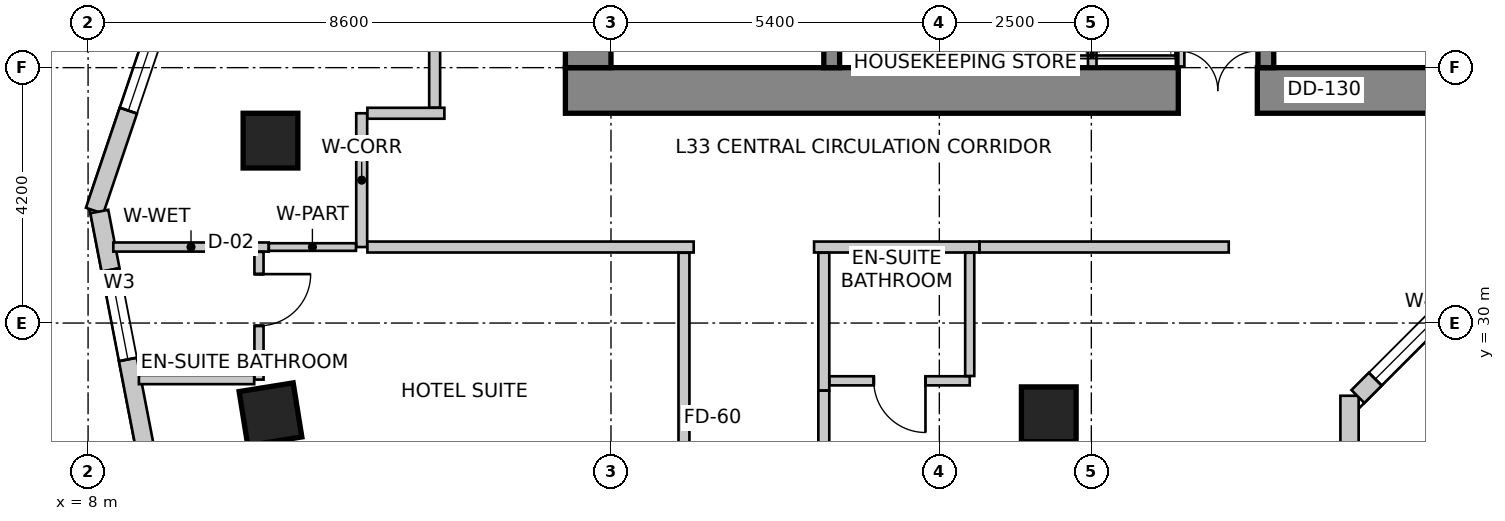
"""IFC4 building model, lengths in metres.
Left out: names, types, materials, properties, quantities, classifications, styles, units other than length and angle.
Written with IfcOpenShell. Run it as: python <this file> out.ifc"""

import sys

from ifc_helpers import new_model, si_unit, direction, frame, frame_2d, origin, origin_2d, place, context, subcontext, project, spatial, rectangle, extrude, source, transform, mapped, element, fill, save


model = new_model("IFC4")
c1 = context("Model", 3, precision=1e-05, world=origin(), true_north=direction((0.0, 1.0)))
c2 = subcontext(c1, "Body", "Model", "MODEL_VIEW")
j1 = project(units=[si_unit("LENGTHUNIT", "METRE"), si_unit("PLANEANGLEUNIT", "RADIAN")], contexts=[c1])
p1 = place(None, origin())
s1 = spatial("IfcSite", under=j1, at=p1, CompositionType="ELEMENT")
p2 = place(p1, origin())
s2 = spatial("IfcBuilding", under=s1, at=p2, CompositionType="ELEMENT")
p3 = place(p2, frame((0.0, 0.0, 135.8)))
s3 = spatial("IfcBuildingStorey", under=s2, at=p3, CompositionType="ELEMENT", Elevation=135.8)
p4 = place(p3, frame((15.85, 33.825, 0.0), z_axis=(0.0, 0.0, 1.0), x_axis=(1.0, 0.0, 0.0)))
e1 = element("IfcWall", 1, at=p4, inside=s3, PredefinedType="SHEAR", context=c2, shape_type="SweptSolid", body=[
    extrude(rectangle(XDim=15.9, YDim=0.75, at=frame_2d((7.95, 0.0))), origin(), (0.0, 0.0, 1.0), 3.6),
])
m1 = source(origin(), c2, "Body", "SweptSolid", [
    extrude(rectangle(XDim=1.3, YDim=2.15, at=frame_2d((0.65, 1.075))), frame((0.0, 0.385, 0.0), z_axis=(0.0, -1.0, 0.0), x_axis=(1.0, 0.0, 0.0)), (0.0, 0.0, 1.0), 0.77),
])
p5 = place(p4, frame((10.08, 0.0, 0.0)))
e2 = element("IfcOpeningElement", 2, at=p5, cuts=e1, PredefinedType="OPENING", context=c2, shape_type="MappedRepresentation", body=[
    mapped(m1, transform((0.0, 0.0, 0.0), scale=1.0)),
])
p6 = place(p3, frame((16.225, 34.2, 0.0), z_axis=(0.0, 0.0, 1.0), x_axis=(0.0, 1.0, 0.0)))
e3 = element("IfcWall", 3, at=p6, inside=s3, PredefinedType="SHEAR", context=c2, shape_type="SweptSolid", body=[
    extrude(rectangle(XDim=11.4, YDim=0.75, at=frame_2d((5.7, 0.0))), origin(), (0.0, 0.0, 1.0), 3.6),
])
m2 = source(origin(), c2, "Body", "SweptSolid", [
    extrude(rectangle(XDim=1.1, YDim=2.15, at=frame_2d((0.55, 1.075))), frame((0.0, 0.385, 0.0), z_axis=(0.0, -1.0, 0.0), x_axis=(1.0, 0.0, 0.0)), (0.0, 0.0, 1.0), 0.77),
])
p7 = place(p6, frame((7.15, 0.0, 0.0)))
e4 = element("IfcOpeningElement", 4, at=p7, cuts=e3, PredefinedType="OPENING", context=c2, shape_type="MappedRepresentation", body=[
    mapped(m2, transform((0.0, 0.0, 0.0), scale=1.0)),
])
p8 = place(p3, frame((20.23, 34.2, 0.0), z_axis=(0.0, 0.0, 1.0), x_axis=(0.0, 1.0, 0.0)))
e5 = element("IfcWall", 5, at=p8, inside=s3, PredefinedType="SHEAR", context=c2, shape_type="SweptSolid", body=[
    extrude(rectangle(XDim=9.06, YDim=0.26, at=frame_2d((4.53, 0.0))), origin(), (0.0, 0.0, 1.0), 3.6),
])
m3 = source(origin(), c2, "Body", "SweptSolid", [
    extrude(rectangle(XDim=1.1, YDim=2.15, at=frame_2d((0.55, 1.075))), frame((0.0, 0.14, 0.0), z_axis=(0.0, -1.0, 0.0), x_axis=(1.0, 0.0, 0.0)), (0.0, 0.0, 1.0), 0.28),
])
p9 = place(p8, frame((7.45, 0.0, 0.0)))
e6 = element("IfcOpeningElement", 6, at=p9, cuts=e5, PredefinedType="OPENING", context=c2, shape_type="MappedRepresentation", body=[
    mapped(m3, transform((0.0, 0.0, 0.0), scale=1.0)),
])
p10 = place(p3, frame((27.37, 34.2, 0.0), z_axis=(0.0, 0.0, 1.0), x_axis=(0.0, 1.0, 0.0)))
e7 = element("IfcWall", 7, at=p10, inside=s3, PredefinedType="SHEAR", context=c2, shape_type="SweptSolid", body=[
    extrude(rectangle(XDim=9.06, YDim=0.26, at=frame_2d((4.53, 0.0))), origin(), (0.0, 0.0, 1.0), 3.6),
])
p11 = place(p10, frame((7.45, 0.0, 0.0)))
e8 = element("IfcOpeningElement", 8, at=p11, cuts=e7, PredefinedType="OPENING", context=c2, shape_type="MappedRepresentation", body=[
    mapped(m3, transform((0.0, 0.0, 0.0), scale=1.0)),
])
m4 = source(origin(), c2, "Body", "SweptSolid", [
    extrude(rectangle(XDim=0.9, YDim=0.9, at=origin_2d()), origin(), (0.0, 0.0, 1.0), 3.6),
])
for number, where, z_axis, x_axis in (
    (9, (11.0, 33.0, 0.0), (0.0, 0.0, 1.0), (1.0, 0.0, 0.0)),
    (10, (11.0, 28.5, 0.0), (0.0, 0.0, 1.0), (0.158, -0.987, 0.0)),
    (11, (23.8, 28.5, 0.0), (0.0, 0.0, 1.0), (1.0, 0.0, 0.0)),
):
    element("IfcColumn", number, at=place(p3, frame(where, z_axis=z_axis, x_axis=x_axis)), inside=s3, PredefinedType="COLUMN", context=c2, shape_type="MappedRepresentation", body=[
        mapped(m4, transform((0.0, 0.0, 0.0), scale=1.0)),
    ])
p12 = place(p3, frame((28.746, 27.577, 0.0), z_axis=(0.0, 0.0, 1.0), x_axis=(0.0, 1.0, 0.0)))
e12 = element("IfcWall", 12, at=p12, inside=s3, PredefinedType="SOLIDWALL", context=c2, shape_type="SweptSolid", body=[
    extrude(rectangle(XDim=1.228, YDim=0.3, at=frame_2d((0.614, 0.0))), origin(), (0.0, 0.0, 1.0), 3.3),
])
p13 = place(p3, frame((28.884, 28.792, 0.0), z_axis=(0.0, 0.0, 1.0), x_axis=(0.707064797706, 0.707148762175, 0.0)))
e13 = element("IfcWall", 13, at=p13, inside=s3, PredefinedType="SOLIDWALL", context=c2, shape_type="SweptSolid", body=[
    extrude(rectangle(XDim=2.908, YDim=0.3, at=frame_2d((1.454, 0.0))), origin(), (0.0, 0.0, 1.0), 3.3),
])
m5 = source(origin(), c2, "Body", "SweptSolid", [
    extrude(rectangle(XDim=2.1, YDim=2.0, at=frame_2d((1.05, 1.0))), frame((0.0, 0.16, 0.0), z_axis=(0.0, -1.0, 0.0), x_axis=(1.0, 0.0, 0.0)), (0.0, 0.0, 1.0), 0.32),
])
p14 = place(p13, frame((0.404, 0.0, 0.85)))
e14 = element("IfcOpeningElement", 14, at=p14, cuts=e13, PredefinedType="OPENING", context=c2, shape_type="MappedRepresentation", body=[
    mapped(m5, transform((0.0, 0.0, 0.0), scale=1.0)),
])
p15 = place(p3, frame((13.269, 47.134, 0.0), z_axis=(0.0, 0.0, 1.0), x_axis=(-0.319929596295, -0.947441319246, 0.0)))
e15 = element("IfcWall", 15, at=p15, inside=s3, PredefinedType="SOLIDWALL", context=c2, shape_type="SweptSolid", body=[
    extrude(rectangle(XDim=16.134, YDim=0.3, at=frame_2d((8.067, 0.0))), origin(), (0.0, 0.0, 1.0), 3.3),
])
p16 = place(p15, frame((2.426, 0.0, 0.85)))
e16 = element("IfcOpeningElement", 16, at=p16, cuts=e15, PredefinedType="OPENING", context=c2, shape_type="MappedRepresentation", body=[
    mapped(m5, transform((0.0, 0.0, 0.0), scale=1.0)),
])
m6 = source(origin(), c2, "Body", "SweptSolid", [
    extrude(rectangle(XDim=2.4, YDim=2.2, at=frame_2d((1.2, 1.1))), frame((0.0, 0.16, 0.0), z_axis=(0.0, -1.0, 0.0), x_axis=(1.0, 0.0, 0.0)), (0.0, 0.0, 1.0), 0.32),
])
p17 = place(p15, frame((7.211, 0.0, 0.85)))
e17 = element("IfcOpeningElement", 17, at=p17, cuts=e15, PredefinedType="OPENING", context=c2, shape_type="MappedRepresentation", body=[
    mapped(m6, transform((0.0, 0.0, 0.0), scale=1.0)),
])
p18 = place(p15, frame((12.297, 0.0, 0.85)))
e18 = element("IfcOpeningElement", 18, at=p18, cuts=e15, PredefinedType="OPENING", context=c2, shape_type="MappedRepresentation", body=[
    mapped(m5, transform((0.0, 0.0, 0.0), scale=1.0)),
])
p19 = place(p3, frame((8.185, 31.834, 0.0), z_axis=(0.0, 0.0, 1.0), x_axis=(0.189707113148, -0.981840725994, 0.0)))
e19 = element("IfcWall", 19, at=p19, inside=s3, PredefinedType="SOLIDWALL", context=c2, shape_type="SweptSolid", body=[
    extrude(rectangle(XDim=21.221, YDim=0.3, at=frame_2d((10.611, 0.0))), origin(), (0.0, 0.0, 1.0), 3.3),
])
m7 = source(origin(), c2, "Body", "SweptSolid", [
    extrude(rectangle(XDim=1.5, YDim=1.8, at=frame_2d((0.75, 0.9))), frame((0.0, 0.16, 0.0), z_axis=(0.0, -1.0, 0.0), x_axis=(1.0, 0.0, 0.0)), (0.0, 0.0, 1.0), 0.32),
])
p20 = place(p19, frame((0.977, 0.0, 0.85)))
e20 = element("IfcOpeningElement", 20, at=p20, cuts=e19, PredefinedType="OPENING", context=c2, shape_type="MappedRepresentation", body=[
    mapped(m7, transform((0.0, 0.0, 0.0), scale=1.0)),
])
p21 = place(p19, frame((4.219, 0.0, 0.85)))
e21 = element("IfcOpeningElement", 21, at=p21, cuts=e19, PredefinedType="OPENING", context=c2, shape_type="MappedRepresentation", body=[
    mapped(m6, transform((0.0, 0.0, 0.0), scale=1.0)),
])
p22 = place(p19, frame((8.371, 0.0, 0.85)))
e22 = element("IfcOpeningElement", 22, at=p22, cuts=e19, PredefinedType="OPENING", context=c2, shape_type="MappedRepresentation", body=[
    mapped(m7, transform((0.0, 0.0, 0.0), scale=1.0)),
])
p23 = place(p19, frame((12.504, 0.0, 0.85)))
e23 = element("IfcOpeningElement", 23, at=p23, cuts=e19, PredefinedType="OPENING", context=c2, shape_type="MappedRepresentation", body=[
    mapped(m6, transform((0.0, 0.0, 0.0), scale=1.0)),
])
p24 = place(p19, frame((17.944, 0.0, 0.85)))
e24 = element("IfcOpeningElement", 24, at=p24, cuts=e19, PredefinedType="OPENING", context=c2, shape_type="MappedRepresentation", body=[
    mapped(m6, transform((0.0, 0.0, 0.0), scale=1.0)),
])
for number, where, z_axis, x_axis in (
    (25, (25.96, 34.22, 0.0), (0.0, 0.0, 1.0), (0.0, 1.0, 0.0)),
    (26, (23.07, 34.22, 0.0), (0.0, 0.0, 1.0), (0.0, 1.0, 0.0)),
    (27, (24.515, 34.22, 0.0), (0.0, 0.0, 1.0), (0.0, 1.0, 0.0)),
):
    element("IfcWall", number, at=place(p3, frame(where, z_axis=z_axis, x_axis=x_axis)), inside=s3, PredefinedType="SOLIDWALL", context=c2, shape_type="SweptSolid", body=[
        extrude(rectangle(XDim=1.62, YDim=0.14, at=frame_2d((0.81, 0.0))), origin(), (0.0, 0.0, 1.0), 2.592),
    ])
p25 = place(p3, frame((12.5, 31.25, 0.0), z_axis=(0.0, 0.0, 1.0), x_axis=(0.0, 1.0, 0.0)))
e28 = element("IfcWall", 28, at=p25, inside=s3, PredefinedType="PARTITIONING", context=c2, shape_type="SweptSolid", body=[
    extrude(rectangle(XDim=2.2, YDim=0.18, at=frame_2d((1.1, 0.0))), origin(), (0.0, 0.0, 1.0), 2.885),
])
p26 = place(p3, frame((12.594, 33.45, 0.0), z_axis=(0.0, 0.0, 1.0), x_axis=(1.0, 0.0, 0.0)))
e29 = element("IfcWall", 29, at=p26, inside=s3, PredefinedType="PARTITIONING", context=c2, shape_type="SweptSolid", body=[
    extrude(rectangle(XDim=1.266, YDim=0.18, at=frame_2d((0.633, 0.0))), origin(), (0.0, 0.0, 1.0), 3.3),
])
p27 = place(p3, frame((17.96, 31.25, 0.0), z_axis=(0.0, 0.0, 1.0), x_axis=(-1.0, 0.0, 0.0)))
e30 = element("IfcWall", 30, at=p27, inside=s3, PredefinedType="PARTITIONING", context=c2, shape_type="SweptSolid", body=[
    extrude(rectangle(XDim=5.366, YDim=0.18, at=frame_2d((2.683, 0.0))), origin(), (0.0, 0.0, 1.0), 2.885),
])
p28 = place(p3, frame((22.66, 31.25, 0.0), z_axis=(0.0, 0.0, 1.0), x_axis=(-1.0, 0.0, 0.0)))
e31 = element("IfcWall", 31, at=p28, inside=s3, PredefinedType="PARTITIONING", context=c2, shape_type="SweptSolid", body=[
    extrude(rectangle(XDim=2.72, YDim=0.18, at=frame_2d((1.36, 0.0))), origin(), (0.0, 0.0, 1.0), 2.885),
])
p29 = place(p3, frame((26.76, 31.25, 0.0), z_axis=(0.0, 0.0, 1.0), x_axis=(-1.0, 0.0, 0.0)))
e32 = element("IfcWall", 32, at=p29, inside=s3, PredefinedType="PARTITIONING", context=c2, shape_type="SweptSolid", body=[
    extrude(rectangle(XDim=4.098, YDim=0.18, at=frame_2d((2.049, 0.0))), origin(), (0.0, 0.0, 1.0), 3.3),
])
p30 = place(p3, frame((13.7, 33.544, 0.0), z_axis=(0.0, 0.0, 1.0), x_axis=(0.0, 1.0, 0.0)))
e33 = element("IfcWall", 33, at=p30, inside=s3, PredefinedType="PARTITIONING", context=c2, shape_type="SweptSolid", body=[
    extrude(rectangle(XDim=13.86, YDim=0.18, at=frame_2d((6.93, 0.0))), origin(), (0.0, 0.0, 1.0), 2.442),
])
m8 = source(origin(), c2, "Body", "SweptSolid", [
    extrude(rectangle(XDim=0.9, YDim=2.15, at=frame_2d((0.45, 1.075))), frame((0.0, 0.1, 0.0), z_axis=(0.0, -1.0, 0.0), x_axis=(1.0, 0.0, 0.0)), (0.0, 0.0, 1.0), 0.2),
])
p31 = place(p30, frame((4.253, 0.0, 0.0)))
e34 = element("IfcOpeningElement", 34, at=p31, cuts=e33, PredefinedType="OPENING", context=c2, shape_type="MappedRepresentation", body=[
    mapped(m8, transform((0.0, 0.0, 0.0), scale=1.0)),
])
p32 = place(p3, frame((10.971, 31.25, 0.0), z_axis=(0.0, 0.0, 1.0), x_axis=(-1.0, 0.0, 0.0)))
e35 = element("IfcWall", 35, at=p32, inside=s3, PredefinedType="PARTITIONING", context=c2, shape_type="SweptSolid", body=[
    extrude(rectangle(XDim=2.556, YDim=0.15, at=frame_2d((1.278, 0.0))), origin(), (0.0, 0.0, 1.0), 2.442),
])
p33 = place(p3, frame((12.406, 31.25, 0.0), z_axis=(0.0, 0.0, 1.0), x_axis=(-1.0, 0.0, 0.0)))
e36 = element("IfcWall", 36, at=p33, inside=s3, PredefinedType="PARTITIONING", context=c2, shape_type="SweptSolid", body=[
    extrude(rectangle(XDim=1.433, YDim=0.125, at=frame_2d((0.717, 0.0))), origin(), (0.0, 0.0, 1.0), 2.442),
])
p34 = place(p3, frame((17.8, 23.84, 0.0), z_axis=(0.0, 0.0, 1.0), x_axis=(0.0, 1.0, 0.0)))
e37 = element("IfcWall", 37, at=p34, inside=s3, PredefinedType="PARTITIONING", context=c2, shape_type="SweptSolid", body=[
    extrude(rectangle(XDim=7.316, YDim=0.18, at=frame_2d((3.658, 0.0))), origin(), (0.0, 0.0, 1.0), 2.738),
])
p35 = place(p34, frame((3.208, 0.0, 0.0)))
e38 = element("IfcOpeningElement", 38, at=p35, cuts=e37, PredefinedType="OPENING", context=c2, shape_type="MappedRepresentation", body=[
    mapped(m8, transform((0.0, 0.0, 0.0), scale=1.0)),
])
p36 = place(p3, frame((20.1, 31.156, 0.0), z_axis=(0.0, 0.0, 1.0), x_axis=(0.0, -1.0, 0.0)))
e39 = element("IfcWall", 39, at=p36, inside=s3, PredefinedType="PARTITIONING", context=c2, shape_type="SweptSolid", body=[
    extrude(rectangle(XDim=2.266, YDim=0.18, at=frame_2d((1.133, 0.0))), origin(), (0.0, 0.0, 1.0), 2.885),
])
p37 = place(p3, frame((20.1, 28.888, 0.0), z_axis=(0.0, 0.0, 1.0), x_axis=(0.0, -1.0, 0.0)))
e40 = element("IfcWall", 40, at=p37, inside=s3, PredefinedType="PARTITIONING", context=c2, shape_type="SweptSolid", body=[
    extrude(rectangle(XDim=9.548, YDim=0.18, at=frame_2d((4.774, 0.0))), origin(), (0.0, 0.0, 1.0), 2.738),
])
p38 = place(p37, frame((4.264, 0.0, 0.0)))
e41 = element("IfcOpeningElement", 41, at=p38, cuts=e40, PredefinedType="OPENING", context=c2, shape_type="MappedRepresentation", body=[
    mapped(m8, transform((0.0, 0.0, 0.0), scale=1.0)),
])
p39 = place(p3, frame((10.811, 31.171, 0.0), z_axis=(0.0, 0.0, 1.0), x_axis=(0.0, -1.0, 0.0)))
e42 = element("IfcWall", 42, at=p39, inside=s3, PredefinedType="PARTITIONING", context=c2, shape_type="SweptSolid", body=[
    extrude(rectangle(XDim=2.101, YDim=0.15, at=frame_2d((1.05, 0.0))), origin(), (0.0, 0.0, 1.0), 2.442),
])
m9 = source(origin(), c2, "Body", "SweptSolid", [
    extrude(rectangle(XDim=0.85, YDim=2.15, at=frame_2d((0.425, 1.075))), frame((0.0, 0.085, 0.0), z_axis=(0.0, -1.0, 0.0), x_axis=(1.0, 0.0, 0.0)), (0.0, 0.0, 1.0), 0.17),
])
p40 = place(p39, frame((0.366, 0.0, 0.0)))
e43 = element("IfcOpeningElement", 43, at=p40, cuts=e42, PredefinedType="OPENING", context=c2, shape_type="MappedRepresentation", body=[
    mapped(m9, transform((0.0, 0.0, 0.0), scale=1.0)),
])
p41 = place(p3, frame((10.732, 29.07, 0.0), z_axis=(0.0, 0.0, 1.0), x_axis=(-1.0, 0.0, 0.0)))
e44 = element("IfcWall", 44, at=p41, inside=s3, PredefinedType="PARTITIONING", context=c2, shape_type="SweptSolid", body=[
    extrude(rectangle(XDim=1.896, YDim=0.15, at=frame_2d((0.948, 0.0))), origin(), (0.0, 0.0, 1.0), 3.3),
])
p42 = place(p3, frame((22.5, 29.05, 0.0), z_axis=(0.0, 0.0, 1.0), x_axis=(-1.0, 0.0, 0.0)))
e45 = element("IfcWall", 45, at=p42, inside=s3, PredefinedType="PARTITIONING", context=c2, shape_type="SweptSolid", body=[
    extrude(rectangle(XDim=2.306, YDim=0.15, at=frame_2d((1.153, 0.0))), origin(), (0.0, 0.0, 1.0), 2.885),
])
p43 = place(p42, frame((0.728, 0.0, 0.0)))
e46 = element("IfcOpeningElement", 46, at=p43, cuts=e45, PredefinedType="OPENING", context=c2, shape_type="MappedRepresentation", body=[
    mapped(m9, transform((0.0, 0.0, 0.0), scale=1.0)),
])
p44 = place(p3, frame((22.5, 31.156, 0.0), z_axis=(0.0, 0.0, 1.0), x_axis=(0.0, -1.0, 0.0)))
e47 = element("IfcWall", 47, at=p44, inside=s3, PredefinedType="PARTITIONING", context=c2, shape_type="SweptSolid", body=[
    extrude(rectangle(XDim=2.027, YDim=0.15, at=frame_2d((1.014, 0.0))), origin(), (0.0, 0.0, 1.0), 2.885),
])
m10 = source(origin(), c2, "Body", "SweptSolid", [
    extrude(rectangle(XDim=2.1, YDim=2.0, at=frame_2d((1.05, 1.0))), frame((0.0, -0.015, 0.0), z_axis=(0.0, -1.0, 0.0), x_axis=(1.0, 0.0, 0.0)), (0.0, 0.0, 1.0), 0.06),
])
p45 = place(p14, origin())
e48 = element("IfcWindow", 48, at=p45, inside=s3, PartitioningType="SINGLE_PANEL", PredefinedType="WINDOW", context=c2, shape_type="MappedRepresentation", body=[
    mapped(m10, transform((0.0, 0.0, 0.0), scale=1.0)),
])
fill(e14, e48)
p46 = place(p18, origin())
e49 = element("IfcWindow", 49, at=p46, inside=s3, PartitioningType="SINGLE_PANEL", PredefinedType="WINDOW", context=c2, shape_type="MappedRepresentation", body=[
    mapped(m10, transform((0.0, 0.0, 0.0), scale=1.0)),
])
fill(e18, e49)
m11 = source(origin(), c2, "Body", "SweptSolid", [
    extrude(rectangle(XDim=1.5, YDim=1.8, at=frame_2d((0.75, 0.9))), frame((0.0, -0.015, 0.0), z_axis=(0.0, -1.0, 0.0), x_axis=(1.0, 0.0, 0.0)), (0.0, 0.0, 1.0), 0.06),
])
p47 = place(p20, origin())
e50 = element("IfcWindow", 50, at=p47, inside=s3, PartitioningType="SINGLE_PANEL", PredefinedType="WINDOW", context=c2, shape_type="MappedRepresentation", body=[
    mapped(m11, transform((0.0, 0.0, 0.0), scale=1.0)),
])
fill(e20, e50)
m12 = source(origin(), c2, "Body", "SweptSolid", [
    extrude(rectangle(XDim=1.3, YDim=2.15, at=frame_2d((0.65, 1.075))), frame((0.0, 0.025, 0.0), z_axis=(0.0, -1.0, 0.0), x_axis=(1.0, 0.0, 0.0)), (0.0, 0.0, 1.0), 0.05),
])
p48 = place(p5, origin())
e51 = element("IfcDoor", 51, at=p48, inside=s3, OperationType="DOUBLE_DOOR_SINGLE_SWING", PredefinedType="DOOR", context=c2, shape_type="MappedRepresentation", body=[
    mapped(m12, transform((0.0, 0.0, 0.0), scale=1.0)),
])
fill(e2, e51)
m13 = source(origin(), c2, "Body", "SweptSolid", [
    extrude(rectangle(XDim=0.85, YDim=2.15, at=frame_2d((0.425, 1.075))), frame((0.0, 0.025, 0.0), z_axis=(0.0, -1.0, 0.0), x_axis=(1.0, 0.0, 0.0)), (0.0, 0.0, 1.0), 0.05),
])
p49 = place(p40, origin())
e52 = element("IfcDoor", 52, at=p49, inside=s3, OperationType="SINGLE_SWING_LEFT", PredefinedType="DOOR", context=c2, shape_type="MappedRepresentation", body=[
    mapped(m13, transform((0.0, 0.0, 0.0), scale=1.0)),
])
fill(e43, e52)
p50 = place(p43, origin())
e53 = element("IfcDoor", 53, at=p50, inside=s3, OperationType="SINGLE_SWING_LEFT", PredefinedType="DOOR", context=c2, shape_type="MappedRepresentation", body=[
    mapped(m13, transform((0.0, 0.0, 0.0), scale=1.0)),
])
fill(e46, e53)
save(model, sys.argv[1])
